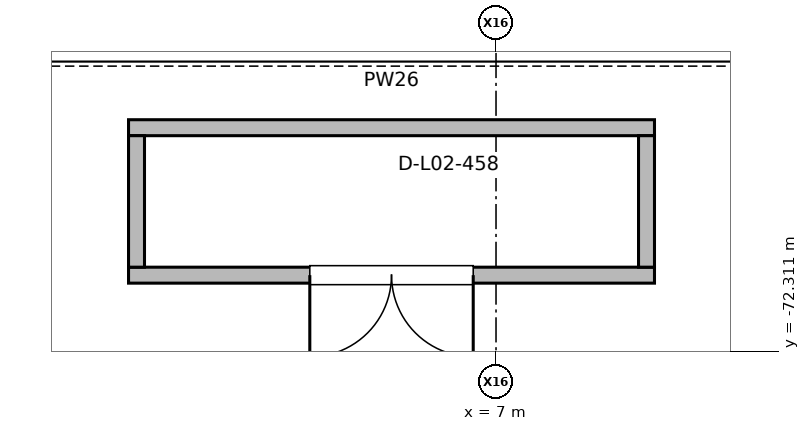
"""IFC4 building model, lengths in metres.
Left out: names, types, materials, properties, quantities, classifications, styles, units other than length and angle.
Written with IfcOpenShell. Run it as: python <this file> out.ifc"""

import sys

from ifc_helpers import new_model, si_unit, direction, frame, frame_2d, origin, place, context, subcontext, project, spatial, rectangle, extrude, element, fill, save


model = new_model("IFC4")
c1 = context("Model", 3, precision=1e-05, world=origin(), true_north=direction((0.0, 1.0)))
c2 = subcontext(c1, "Body", "Model", "MODEL_VIEW")
j1 = project(units=[si_unit("LENGTHUNIT", "METRE"), si_unit("PLANEANGLEUNIT", "RADIAN")], contexts=[c1])
p1 = place(None, origin())
s1 = spatial("IfcSite", under=j1, at=p1, CompositionType="ELEMENT")
p2 = place(p1, origin())
s2 = spatial("IfcBuilding", under=s1, at=p2, CompositionType="ELEMENT")
p3 = place(p2, frame((0.0, 0.0, 6.0)))
s3 = spatial("IfcBuildingStorey", under=s2, at=p3, CompositionType="ELEMENT", Elevation=6.0)
p4 = place(p3, frame((9.085, -71.31, 0.0), z_axis=(0.0, 0.0, 1.0), x_axis=(-1.0, 0.0, 0.0)))
e1 = element("IfcWall", 1, at=p4, inside=s3, PredefinedType="PARTITIONING", context=c2, shape_type="SweptSolid", body=[
    extrude(rectangle(XDim=6.92, YDim=0.21, at=frame_2d((3.46, 0.0))), origin(), (0.0, 0.0, 1.0), 4.42),
])
p5 = place(p4, frame((2.385, 0.0, 0.0)))
e2 = element("IfcOpeningElement", 2, at=p5, cuts=e1, PredefinedType="OPENING", context=c2, shape_type="SweptSolid", body=[
    extrude(rectangle(XDim=2.15, YDim=2.45, at=frame_2d((1.075, 1.225))), frame((0.0, 0.115, 0.0), z_axis=(0.0, -1.0, 0.0), x_axis=(1.0, 0.0, 0.0)), (0.0, 0.0, 1.0), 0.23),
])
p6 = place(p3, frame((2.165, -69.37, 0.0), z_axis=(0.0, 0.0, 1.0), x_axis=(1.0, 0.0, 0.0)))
e3 = element("IfcWall", 3, at=p6, inside=s3, PredefinedType="PARTITIONING", context=c2, shape_type="SweptSolid", body=[
    extrude(rectangle(XDim=6.92, YDim=0.21, at=frame_2d((3.46, 0.0))), origin(), (0.0, 0.0, 1.0), 4.42),
])
for number, where, z_axis, x_axis in (
    (4, (2.27, -71.205, 0.0), (0.0, 0.0, 1.0), (0.0, 1.0, 0.0)),
    (5, (8.98, -71.205, 0.0), (0.0, 0.0, 1.0), (0.0, 1.0, 0.0)),
):
    element("IfcWall", number, at=place(p3, frame(where, z_axis=z_axis, x_axis=x_axis)), inside=s3, PredefinedType="PARTITIONING", context=c2, shape_type="SweptSolid", body=[
        extrude(rectangle(XDim=1.73, YDim=0.21, at=frame_2d((0.865, 0.0))), origin(), (0.0, 0.0, 1.0), 4.42),
    ])
p7 = place(p5, origin())
e6 = element("IfcDoor", 6, at=p7, inside=s3, OperationType="DOUBLE_DOOR_SINGLE_SWING", PredefinedType="DOOR", context=c2, shape_type="SweptSolid", body=[
    extrude(rectangle(XDim=2.15, YDim=2.45, at=frame_2d((1.075, 1.225))), frame((0.0, 0.025, 0.0), z_axis=(0.0, -1.0, 0.0), x_axis=(1.0, 0.0, 0.0)), (0.0, 0.0, 1.0), 0.05),
])
fill(e2, e6)
save(model, sys.argv[1])
